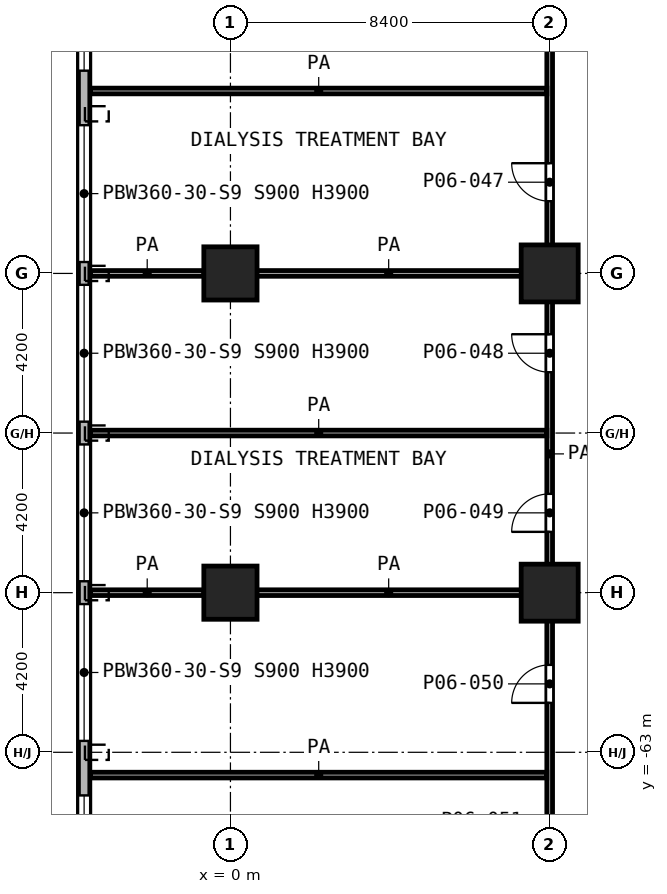
"""IFC4 building model, lengths in metres.
Left out: names, types, materials, properties, quantities, classifications, styles, units other than length and angle.
Written with IfcOpenShell. Run it as: python <this file> out.ifc"""

import sys

from ifc_helpers import new_model, si_unit, direction, frame, frame_2d, origin, origin_2d, place, context, subcontext, project, spatial, rectangle, extrude, element, fill, save


model = new_model("IFC4")
c1 = context("Model", 3, precision=1e-05, world=origin(), true_north=direction((0.0, 1.0)))
c2 = subcontext(c1, "Body", "Model", "MODEL_VIEW")
j1 = project(units=[si_unit("LENGTHUNIT", "METRE"), si_unit("PLANEANGLEUNIT", "RADIAN")], contexts=[c1])
p1 = place(None, origin())
s1 = spatial("IfcSite", under=j1, at=p1, CompositionType="ELEMENT")
p2 = place(p1, origin())
s2 = spatial("IfcBuilding", under=s1, at=p2, CompositionType="ELEMENT")
p3 = place(p2, frame((0.0, 0.0, 29.0)))
s3 = spatial("IfcBuildingStorey", under=s2, at=p3, CompositionType="ELEMENT", Elevation=29.0)
p4 = place(p3, frame((0.0, -50.4, 0.0), z_axis=(0.0, 0.0, 1.0), x_axis=(1.0, 0.0, 0.0)))
e1 = element("IfcColumn", 1, at=p4, inside=s3, PredefinedType="COLUMN", context=c2, shape_type="SweptSolid", body=[
    extrude(rectangle(XDim=1.4, YDim=1.4, at=origin_2d()), origin(), (0.0, 0.0, 1.0), 5.2),
])
p5 = place(p3, frame((8.4, -50.4, 0.0), z_axis=(0.0, 0.0, 1.0), x_axis=(1.0, 0.0, 0.0)))
e2 = element("IfcColumn", 2, at=p5, inside=s3, PredefinedType="COLUMN", context=c2, shape_type="SweptSolid", body=[
    extrude(rectangle(XDim=1.5, YDim=1.5, at=origin_2d()), origin(), (0.0, 0.0, 1.0), 5.2),
])
p6 = place(p3, frame((0.0, -58.8, 0.0), z_axis=(0.0, 0.0, 1.0), x_axis=(1.0, 0.0, 0.0)))
e3 = element("IfcColumn", 3, at=p6, inside=s3, PredefinedType="COLUMN", context=c2, shape_type="SweptSolid", body=[
    extrude(rectangle(XDim=1.4, YDim=1.4, at=origin_2d()), origin(), (0.0, 0.0, 1.0), 5.2),
])
p7 = place(p3, frame((8.4, -58.8, 0.0), z_axis=(0.0, 0.0, 1.0), x_axis=(1.0, 0.0, 0.0)))
e4 = element("IfcColumn", 4, at=p7, inside=s3, PredefinedType="COLUMN", context=c2, shape_type="SweptSolid", body=[
    extrude(rectangle(XDim=1.5, YDim=1.5, at=origin_2d()), origin(), (0.0, 0.0, 1.0), 5.2),
])
p8 = place(p3, frame((-3.85, -2.062, 0.0), z_axis=(0.0, 0.0, 1.0), x_axis=(0.0, -1.0, 0.0)))
e5 = element("IfcWall", 5, at=p8, inside=s3, PredefinedType="SOLIDWALL", context=c2, shape_type="SweptSolid", body=[
    extrude(rectangle(XDim=79.876, YDim=0.3, at=frame_2d((39.938, 0.0))), origin(), (0.0, 0.0, 1.0), 4.7),
])
p9 = place(p8, frame((0.438, 0.0, 0.9)))
e6 = element("IfcOpeningElement", 6, at=p9, cuts=e5, PredefinedType="OPENING", context=c2, shape_type="SweptSolid", body=[
    extrude(rectangle(XDim=1.2, YDim=3.0, at=frame_2d((0.6, 1.5))), frame((0.0, 0.16, 0.0), z_axis=(0.0, -1.0, 0.0), x_axis=(1.0, 0.0, 0.0)), (0.0, 0.0, 1.0), 0.32),
])
p10 = place(p8, frame((2.438, 0.0, 0.9)))
e7 = element("IfcOpeningElement", 7, at=p10, cuts=e5, PredefinedType="OPENING", context=c2, shape_type="SweptSolid", body=[
    extrude(rectangle(XDim=3.6, YDim=3.0, at=frame_2d((1.8, 1.5))), frame((0.0, 0.16, 0.0), z_axis=(0.0, -1.0, 0.0), x_axis=(1.0, 0.0, 0.0)), (0.0, 0.0, 1.0), 0.32),
])
p11 = place(p8, frame((6.638, 0.0, 0.9)))
e8 = element("IfcOpeningElement", 8, at=p11, cuts=e5, PredefinedType="OPENING", context=c2, shape_type="SweptSolid", body=[
    extrude(rectangle(XDim=3.6, YDim=3.0, at=frame_2d((1.8, 1.5))), frame((0.0, 0.16, 0.0), z_axis=(0.0, -1.0, 0.0), x_axis=(1.0, 0.0, 0.0)), (0.0, 0.0, 1.0), 0.32),
])
p12 = place(p8, frame((10.838, 0.0, 0.9)))
e9 = element("IfcOpeningElement", 9, at=p12, cuts=e5, PredefinedType="OPENING", context=c2, shape_type="SweptSolid", body=[
    extrude(rectangle(XDim=3.6, YDim=3.0, at=frame_2d((1.8, 1.5))), frame((0.0, 0.16, 0.0), z_axis=(0.0, -1.0, 0.0), x_axis=(1.0, 0.0, 0.0)), (0.0, 0.0, 1.0), 0.32),
])
p13 = place(p8, frame((15.038, 0.0, 0.9)))
e10 = element("IfcOpeningElement", 10, at=p13, cuts=e5, PredefinedType="OPENING", context=c2, shape_type="SweptSolid", body=[
    extrude(rectangle(XDim=3.6, YDim=3.0, at=frame_2d((1.8, 1.5))), frame((0.0, 0.16, 0.0), z_axis=(0.0, -1.0, 0.0), x_axis=(1.0, 0.0, 0.0)), (0.0, 0.0, 1.0), 0.32),
])
p14 = place(p8, frame((19.238, 0.0, 0.9)))
e11 = element("IfcOpeningElement", 11, at=p14, cuts=e5, PredefinedType="OPENING", context=c2, shape_type="SweptSolid", body=[
    extrude(rectangle(XDim=3.6, YDim=3.0, at=frame_2d((1.8, 1.5))), frame((0.0, 0.16, 0.0), z_axis=(0.0, -1.0, 0.0), x_axis=(1.0, 0.0, 0.0)), (0.0, 0.0, 1.0), 0.32),
])
p15 = place(p8, frame((24.323, 0.0, 0.9)))
e12 = element("IfcOpeningElement", 12, at=p15, cuts=e5, PredefinedType="OPENING", context=c2, shape_type="SweptSolid", body=[
    extrude(rectangle(XDim=2.4, YDim=3.0, at=frame_2d((1.2, 1.5))), frame((0.0, 0.16, 0.0), z_axis=(0.0, -1.0, 0.0), x_axis=(1.0, 0.0, 0.0)), (0.0, 0.0, 1.0), 0.32),
])
p16 = place(p8, frame((27.638, 0.0, 0.9)))
e13 = element("IfcOpeningElement", 13, at=p16, cuts=e5, PredefinedType="OPENING", context=c2, shape_type="SweptSolid", body=[
    extrude(rectangle(XDim=3.6, YDim=3.0, at=frame_2d((1.8, 1.5))), frame((0.0, 0.16, 0.0), z_axis=(0.0, -1.0, 0.0), x_axis=(1.0, 0.0, 0.0)), (0.0, 0.0, 1.0), 0.32),
])
p17 = place(p8, frame((32.823, 0.0, 0.9)))
e14 = element("IfcOpeningElement", 14, at=p17, cuts=e5, PredefinedType="OPENING", context=c2, shape_type="SweptSolid", body=[
    extrude(rectangle(XDim=2.4, YDim=3.0, at=frame_2d((1.2, 1.5))), frame((0.0, 0.16, 0.0), z_axis=(0.0, -1.0, 0.0), x_axis=(1.0, 0.0, 0.0)), (0.0, 0.0, 1.0), 0.32),
])
p18 = place(p8, frame((36.038, 0.0, 0.9)))
e15 = element("IfcOpeningElement", 15, at=p18, cuts=e5, PredefinedType="OPENING", context=c2, shape_type="SweptSolid", body=[
    extrude(rectangle(XDim=3.6, YDim=3.0, at=frame_2d((1.8, 1.5))), frame((0.0, 0.16, 0.0), z_axis=(0.0, -1.0, 0.0), x_axis=(1.0, 0.0, 0.0)), (0.0, 0.0, 1.0), 0.32),
])
p19 = place(p8, frame((40.603, 0.0, 0.9)))
e16 = element("IfcOpeningElement", 16, at=p19, cuts=e5, PredefinedType="OPENING", context=c2, shape_type="SweptSolid", body=[
    extrude(rectangle(XDim=2.4, YDim=3.0, at=frame_2d((1.2, 1.5))), frame((0.0, 0.16, 0.0), z_axis=(0.0, -1.0, 0.0), x_axis=(1.0, 0.0, 0.0)), (0.0, 0.0, 1.0), 0.32),
])
p20 = place(p8, frame((44.438, 0.0, 0.9)))
e17 = element("IfcOpeningElement", 17, at=p20, cuts=e5, PredefinedType="OPENING", context=c2, shape_type="SweptSolid", body=[
    extrude(rectangle(XDim=3.6, YDim=3.0, at=frame_2d((1.8, 1.5))), frame((0.0, 0.16, 0.0), z_axis=(0.0, -1.0, 0.0), x_axis=(1.0, 0.0, 0.0)), (0.0, 0.0, 1.0), 0.32),
])
p21 = place(p8, frame((48.638, 0.0, 0.9)))
e18 = element("IfcOpeningElement", 18, at=p21, cuts=e5, PredefinedType="OPENING", context=c2, shape_type="SweptSolid", body=[
    extrude(rectangle(XDim=3.6, YDim=3.0, at=frame_2d((1.8, 1.5))), frame((0.0, 0.16, 0.0), z_axis=(0.0, -1.0, 0.0), x_axis=(1.0, 0.0, 0.0)), (0.0, 0.0, 1.0), 0.32),
])
p22 = place(p8, frame((52.838, 0.0, 0.9)))
e19 = element("IfcOpeningElement", 19, at=p22, cuts=e5, PredefinedType="OPENING", context=c2, shape_type="SweptSolid", body=[
    extrude(rectangle(XDim=3.6, YDim=3.0, at=frame_2d((1.8, 1.5))), frame((0.0, 0.16, 0.0), z_axis=(0.0, -1.0, 0.0), x_axis=(1.0, 0.0, 0.0)), (0.0, 0.0, 1.0), 0.32),
])
p23 = place(p8, frame((57.038, 0.0, 0.9)))
e20 = element("IfcOpeningElement", 20, at=p23, cuts=e5, PredefinedType="OPENING", context=c2, shape_type="SweptSolid", body=[
    extrude(rectangle(XDim=3.6, YDim=3.0, at=frame_2d((1.8, 1.5))), frame((0.0, 0.16, 0.0), z_axis=(0.0, -1.0, 0.0), x_axis=(1.0, 0.0, 0.0)), (0.0, 0.0, 1.0), 0.32),
])
p24 = place(p8, frame((62.073, 0.0, 0.9)))
e21 = element("IfcOpeningElement", 21, at=p24, cuts=e5, PredefinedType="OPENING", context=c2, shape_type="SweptSolid", body=[
    extrude(rectangle(XDim=2.4, YDim=3.0, at=frame_2d((1.2, 1.5))), frame((0.0, 0.16, 0.0), z_axis=(0.0, -1.0, 0.0), x_axis=(1.0, 0.0, 0.0)), (0.0, 0.0, 1.0), 0.32),
])
p25 = place(p8, frame((65.438, 0.0, 0.9)))
e22 = element("IfcOpeningElement", 22, at=p25, cuts=e5, PredefinedType="OPENING", context=c2, shape_type="SweptSolid", body=[
    extrude(rectangle(XDim=3.6, YDim=3.0, at=frame_2d((1.8, 1.5))), frame((0.0, 0.16, 0.0), z_axis=(0.0, -1.0, 0.0), x_axis=(1.0, 0.0, 0.0)), (0.0, 0.0, 1.0), 0.32),
])
p26 = place(p8, frame((70.038, 0.0, 0.9)))
e23 = element("IfcOpeningElement", 23, at=p26, cuts=e5, PredefinedType="OPENING", context=c2, shape_type="SweptSolid", body=[
    extrude(rectangle(XDim=1.2, YDim=3.0, at=frame_2d((0.6, 1.5))), frame((0.0, 0.16, 0.0), z_axis=(0.0, -1.0, 0.0), x_axis=(1.0, 0.0, 0.0)), (0.0, 0.0, 1.0), 0.32),
])
p27 = place(p8, frame((73.838, 0.0, 0.9)))
e24 = element("IfcOpeningElement", 24, at=p27, cuts=e5, PredefinedType="OPENING", context=c2, shape_type="SweptSolid", body=[
    extrude(rectangle(XDim=3.6, YDim=3.0, at=frame_2d((1.8, 1.5))), frame((0.0, 0.16, 0.0), z_axis=(0.0, -1.0, 0.0), x_axis=(1.0, 0.0, 0.0)), (0.0, 0.0, 1.0), 0.32),
])
p28 = place(p8, frame((78.323, 0.0, 0.9)))
e25 = element("IfcOpeningElement", 25, at=p28, cuts=e5, PredefinedType="OPENING", context=c2, shape_type="SweptSolid", body=[
    extrude(rectangle(XDim=1.2, YDim=3.0, at=frame_2d((0.6, 1.5))), frame((0.0, 0.16, 0.0), z_axis=(0.0, -1.0, 0.0), x_axis=(1.0, 0.0, 0.0)), (0.0, 0.0, 1.0), 0.32),
])
p29 = place(p3, frame((-3.68, -63.6, 0.0), z_axis=(0.0, 0.0, 1.0), x_axis=(1.0, 0.0, 0.0)))
e26 = element("IfcWall", 26, at=p29, inside=s3, PredefinedType="PARTITIONING", context=c2, shape_type="SweptSolid", body=[
    extrude(rectangle(XDim=12.005, YDim=0.15, at=frame_2d((6.002, 0.0))), origin(), (0.0, 0.0, 1.0), 4.7),
])
p30 = place(p3, frame((-3.68, -58.8, 0.0), z_axis=(0.0, 0.0, 1.0), x_axis=(1.0, 0.0, 0.0)))
e27 = element("IfcWall", 27, at=p30, inside=s3, PredefinedType="PARTITIONING", context=c2, shape_type="SweptSolid", body=[
    extrude(rectangle(XDim=2.98, YDim=0.15, at=frame_2d((1.49, 0.0))), origin(), (0.0, 0.0, 1.0), 4.7),
])
p31 = place(p3, frame((0.002, -58.8, 0.0), z_axis=(0.0, 0.0, 1.0), x_axis=(1.0, 0.0, 0.0)))
e28 = element("IfcWall", 28, at=p31, inside=s3, PredefinedType="PARTITIONING", context=c2, shape_type="SweptSolid", body=[
    extrude(rectangle(XDim=8.323, YDim=0.15, at=frame_2d((4.162, 0.0))), origin(), (0.0, 0.0, 1.0), 4.7),
])
p32 = place(p3, frame((-3.68, -54.6, 0.0), z_axis=(0.0, 0.0, 1.0), x_axis=(1.0, 0.0, 0.0)))
e29 = element("IfcWall", 29, at=p32, inside=s3, PredefinedType="PARTITIONING", context=c2, shape_type="SweptSolid", body=[
    extrude(rectangle(XDim=12.005, YDim=0.15, at=frame_2d((6.002, 0.0))), origin(), (0.0, 0.0, 1.0), 4.7),
])
p33 = place(p3, frame((-3.68, -50.4, 0.0), z_axis=(0.0, 0.0, 1.0), x_axis=(1.0, 0.0, 0.0)))
e30 = element("IfcWall", 30, at=p33, inside=s3, PredefinedType="PARTITIONING", context=c2, shape_type="SweptSolid", body=[
    extrude(rectangle(XDim=2.98, YDim=0.15, at=frame_2d((1.49, 0.0))), origin(), (0.0, 0.0, 1.0), 4.7),
])
p34 = place(p3, frame((0.002, -50.4, 0.0), z_axis=(0.0, 0.0, 1.0), x_axis=(1.0, 0.0, 0.0)))
e31 = element("IfcWall", 31, at=p34, inside=s3, PredefinedType="PARTITIONING", context=c2, shape_type="SweptSolid", body=[
    extrude(rectangle(XDim=8.323, YDim=0.15, at=frame_2d((4.162, 0.0))), origin(), (0.0, 0.0, 1.0), 4.7),
])
p35 = place(p3, frame((-3.68, -45.6, 0.0), z_axis=(0.0, 0.0, 1.0), x_axis=(1.0, 0.0, 0.0)))
e32 = element("IfcWall", 32, at=p35, inside=s3, PredefinedType="PARTITIONING", context=c2, shape_type="SweptSolid", body=[
    extrude(rectangle(XDim=12.005, YDim=0.15, at=frame_2d((6.002, 0.0))), origin(), (0.0, 0.0, 1.0), 4.7),
])
p36 = place(p3, frame((8.4, -67.947, 0.0), z_axis=(0.0, 0.0, 1.0), x_axis=(0.0, 1.0, 0.0)))
e33 = element("IfcWall", 33, at=p36, inside=s3, PredefinedType="PARTITIONING", context=c2, shape_type="SweptSolid", body=[
    extrude(rectangle(XDim=25.597, YDim=0.15, at=frame_2d((12.798, 0.0))), origin(), (0.0, 0.0, 1.0), 4.7),
])
p37 = place(p36, frame((19.447, 0.0, 0.0)))
e34 = element("IfcOpeningElement", 34, at=p37, cuts=e33, PredefinedType="OPENING", context=c2, shape_type="SweptSolid", body=[
    extrude(rectangle(XDim=1.0, YDim=2.1, at=frame_2d((0.5, 1.05))), frame((0.0, 0.085, 0.0), z_axis=(0.0, -1.0, 0.0), x_axis=(1.0, 0.0, 0.0)), (0.0, 0.0, 1.0), 0.17),
])
p38 = place(p36, frame((14.947, 0.0, 0.0)))
e35 = element("IfcOpeningElement", 35, at=p38, cuts=e33, PredefinedType="OPENING", context=c2, shape_type="SweptSolid", body=[
    extrude(rectangle(XDim=1.0, YDim=2.1, at=frame_2d((0.5, 1.05))), frame((0.0, 0.085, 0.0), z_axis=(0.0, -1.0, 0.0), x_axis=(1.0, 0.0, 0.0)), (0.0, 0.0, 1.0), 0.17),
])
p39 = place(p36, frame((10.747, 0.0, 0.0)))
e36 = element("IfcOpeningElement", 36, at=p39, cuts=e33, PredefinedType="OPENING", context=c2, shape_type="SweptSolid", body=[
    extrude(rectangle(XDim=1.0, YDim=2.1, at=frame_2d((0.5, 1.05))), frame((0.0, 0.085, 0.0), z_axis=(0.0, -1.0, 0.0), x_axis=(1.0, 0.0, 0.0)), (0.0, 0.0, 1.0), 0.17),
])
p40 = place(p36, frame((6.247, 0.0, 0.0)))
e37 = element("IfcOpeningElement", 37, at=p40, cuts=e33, PredefinedType="OPENING", context=c2, shape_type="SweptSolid", body=[
    extrude(rectangle(XDim=1.0, YDim=2.1, at=frame_2d((0.5, 1.05))), frame((0.0, 0.085, 0.0), z_axis=(0.0, -1.0, 0.0), x_axis=(1.0, 0.0, 0.0)), (0.0, 0.0, 1.0), 0.17),
])
p41 = place(p36, frame((1.674, 0.0, 0.0)))
e38 = element("IfcOpeningElement", 38, at=p41, cuts=e33, PredefinedType="OPENING", context=c2, shape_type="SweptSolid", body=[
    extrude(rectangle(XDim=1.0, YDim=2.1, at=frame_2d((0.5, 1.05))), frame((0.0, 0.085, 0.0), z_axis=(0.0, -1.0, 0.0), x_axis=(1.0, 0.0, 0.0)), (0.0, 0.0, 1.0), 0.17),
])
p42 = place(p19, origin())
e39 = element("IfcWindow", 39, at=p42, inside=s3, PartitioningType="SINGLE_PANEL", PredefinedType="WINDOW", context=c2, shape_type="SweptSolid", body=[
    extrude(rectangle(XDim=2.4, YDim=3.0, at=frame_2d((1.2, 1.5))), frame((0.0, 0.03, 0.0), z_axis=(0.0, -1.0, 0.0), x_axis=(1.0, 0.0, 0.0)), (0.0, 0.0, 1.0), 0.06),
])
fill(e16, e39)
p43 = place(p20, origin())
e40 = element("IfcWindow", 40, at=p43, inside=s3, PartitioningType="SINGLE_PANEL", PredefinedType="WINDOW", context=c2, shape_type="SweptSolid", body=[
    extrude(rectangle(XDim=3.6, YDim=3.0, at=frame_2d((1.8, 1.5))), frame((0.0, 0.03, 0.0), z_axis=(0.0, -1.0, 0.0), x_axis=(1.0, 0.0, 0.0)), (0.0, 0.0, 1.0), 0.06),
])
fill(e17, e40)
p44 = place(p21, origin())
e41 = element("IfcWindow", 41, at=p44, inside=s3, PartitioningType="SINGLE_PANEL", PredefinedType="WINDOW", context=c2, shape_type="SweptSolid", body=[
    extrude(rectangle(XDim=3.6, YDim=3.0, at=frame_2d((1.8, 1.5))), frame((0.0, 0.03, 0.0), z_axis=(0.0, -1.0, 0.0), x_axis=(1.0, 0.0, 0.0)), (0.0, 0.0, 1.0), 0.06),
])
fill(e18, e41)
p45 = place(p22, origin())
e42 = element("IfcWindow", 42, at=p45, inside=s3, PartitioningType="SINGLE_PANEL", PredefinedType="WINDOW", context=c2, shape_type="SweptSolid", body=[
    extrude(rectangle(XDim=3.6, YDim=3.0, at=frame_2d((1.8, 1.5))), frame((0.0, 0.03, 0.0), z_axis=(0.0, -1.0, 0.0), x_axis=(1.0, 0.0, 0.0)), (0.0, 0.0, 1.0), 0.06),
])
fill(e19, e42)
p46 = place(p23, origin())
e43 = element("IfcWindow", 43, at=p46, inside=s3, PartitioningType="SINGLE_PANEL", PredefinedType="WINDOW", context=c2, shape_type="SweptSolid", body=[
    extrude(rectangle(XDim=3.6, YDim=3.0, at=frame_2d((1.8, 1.5))), frame((0.0, 0.03, 0.0), z_axis=(0.0, -1.0, 0.0), x_axis=(1.0, 0.0, 0.0)), (0.0, 0.0, 1.0), 0.06),
])
fill(e20, e43)
p47 = place(p24, origin())
e44 = element("IfcWindow", 44, at=p47, inside=s3, PartitioningType="SINGLE_PANEL", PredefinedType="WINDOW", context=c2, shape_type="SweptSolid", body=[
    extrude(rectangle(XDim=2.4, YDim=3.0, at=frame_2d((1.2, 1.5))), frame((0.0, 0.03, 0.0), z_axis=(0.0, -1.0, 0.0), x_axis=(1.0, 0.0, 0.0)), (0.0, 0.0, 1.0), 0.06),
])
fill(e21, e44)
p48 = place(p37, origin())
e45 = element("IfcDoor", 45, at=p48, inside=s3, OperationType="SINGLE_SWING_RIGHT", PredefinedType="DOOR", context=c2, shape_type="SweptSolid", body=[
    extrude(rectangle(XDim=1.0, YDim=2.1, at=frame_2d((0.5, 1.05))), frame((0.0, 0.025, 0.0), z_axis=(0.0, -1.0, 0.0), x_axis=(1.0, 0.0, 0.0)), (0.0, 0.0, 1.0), 0.05),
])
fill(e34, e45)
p49 = place(p38, origin())
e46 = element("IfcDoor", 46, at=p49, inside=s3, OperationType="SINGLE_SWING_RIGHT", PredefinedType="DOOR", context=c2, shape_type="SweptSolid", body=[
    extrude(rectangle(XDim=1.0, YDim=2.1, at=frame_2d((0.5, 1.05))), frame((0.0, 0.025, 0.0), z_axis=(0.0, -1.0, 0.0), x_axis=(1.0, 0.0, 0.0)), (0.0, 0.0, 1.0), 0.05),
])
fill(e35, e46)
p50 = place(p39, origin())
e47 = element("IfcDoor", 47, at=p50, inside=s3, OperationType="SINGLE_SWING_LEFT", PredefinedType="DOOR", context=c2, shape_type="SweptSolid", body=[
    extrude(rectangle(XDim=1.0, YDim=2.1, at=frame_2d((0.5, 1.05))), frame((0.0, 0.025, 0.0), z_axis=(0.0, -1.0, 0.0), x_axis=(1.0, 0.0, 0.0)), (0.0, 0.0, 1.0), 0.05),
])
fill(e36, e47)
p51 = place(p40, origin())
e48 = element("IfcDoor", 48, at=p51, inside=s3, OperationType="SINGLE_SWING_LEFT", PredefinedType="DOOR", context=c2, shape_type="SweptSolid", body=[
    extrude(rectangle(XDim=1.0, YDim=2.1, at=frame_2d((0.5, 1.05))), frame((0.0, 0.025, 0.0), z_axis=(0.0, -1.0, 0.0), x_axis=(1.0, 0.0, 0.0)), (0.0, 0.0, 1.0), 0.05),
])
fill(e37, e48)
save(model, sys.argv[1])
